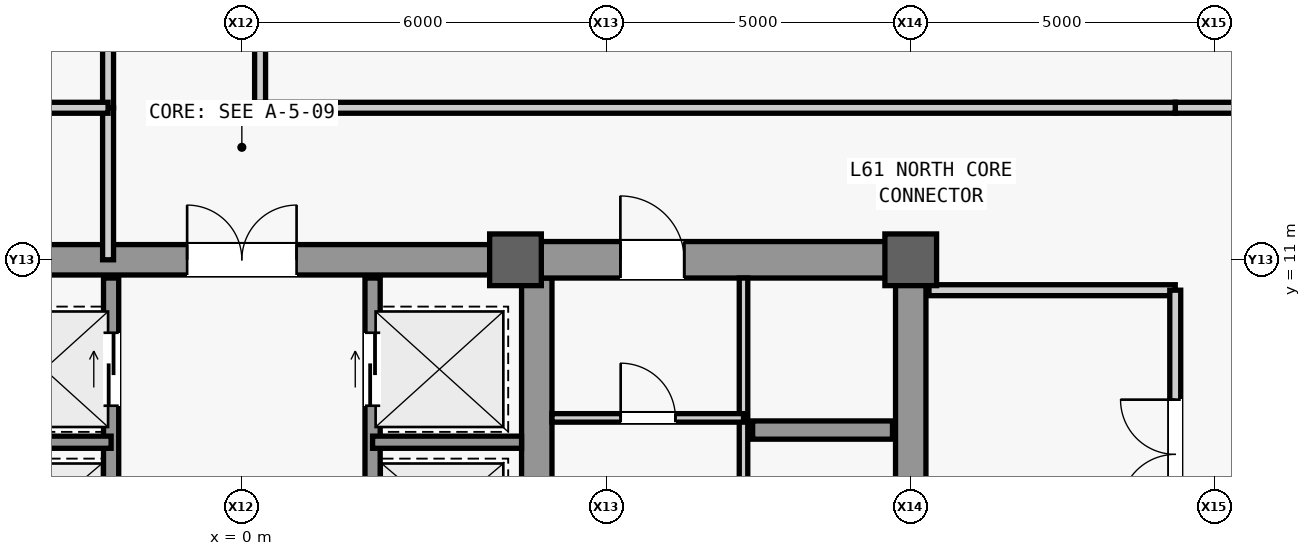
"""IFC4 building model, lengths in metres.
Left out: names, types, materials, properties, quantities, classifications, styles, units other than length and angle.
Written with IfcOpenShell. Run it as: python <this file> out.ifc"""

import sys

from ifc_helpers import new_model, si_unit, direction, frame, frame_2d, origin, origin_2d, place, context, subcontext, project, spatial, rectangle, extrude, source, transform, mapped, element, fill, save


model = new_model("IFC4")
c1 = context("Model", 3, precision=1e-05, world=origin(), true_north=direction((0.0, 1.0)))
c2 = subcontext(c1, "Body", "Model", "MODEL_VIEW")
j1 = project(units=[si_unit("LENGTHUNIT", "METRE"), si_unit("PLANEANGLEUNIT", "RADIAN")], contexts=[c1])
p1 = place(None, origin())
s1 = spatial("IfcSite", under=j1, at=p1, CompositionType="ELEMENT")
p2 = place(p1, origin())
s2 = spatial("IfcBuilding", under=s1, at=p2, CompositionType="ELEMENT")
p3 = place(p2, frame((0.0, 0.0, 259.1)))
s3 = spatial("IfcBuildingStorey", under=s2, at=p3, CompositionType="ELEMENT", Elevation=259.1)
m1 = source(origin(), c2, "Body", "SweptSolid", [
    extrude(rectangle(XDim=22.0, YDim=0.5, at=frame_2d((11.0, 0.0))), origin(), (0.0, 0.0, 1.0), 3.78),
])
p4 = place(p3, frame((11.0, -11.0, 0.0), z_axis=(0.0, 0.0, 1.0), x_axis=(0.0, 1.0, 0.0)))
e1 = element("IfcWall", 1, at=p4, inside=s3, PredefinedType="SHEAR", context=c2, shape_type="MappedRepresentation", body=[
    mapped(m1, transform((0.0, 0.0, 0.0), scale=1.0)),
])
m2 = source(origin(), c2, "Body", "SweptSolid", [
    extrude(rectangle(XDim=1.1, YDim=2.2, at=frame_2d((0.55, 1.1))), frame((0.0, 0.26, 0.0), z_axis=(0.0, -1.0, 0.0), x_axis=(1.0, 0.0, 0.0)), (0.0, 0.0, 1.0), 0.52),
])
p5 = place(p4, frame((0.8, 0.0, 0.0)))
e2 = element("IfcOpeningElement", 2, at=p5, cuts=e1, PredefinedType="OPENING", context=c2, shape_type="MappedRepresentation", body=[
    mapped(m2, transform((0.0, 0.0, 0.0), scale=1.0)),
])
m3 = source(origin(), c2, "Body", "SweptSolid", [
    extrude(rectangle(XDim=0.9, YDim=2.15, at=frame_2d((0.45, 1.075))), frame((0.0, 0.26, 0.0), z_axis=(0.0, -1.0, 0.0), x_axis=(1.0, 0.0, 0.0)), (0.0, 0.0, 1.0), 0.52),
])
p6 = place(p4, frame((6.2, 0.0, 0.0)))
e3 = element("IfcOpeningElement", 3, at=p6, cuts=e1, PredefinedType="OPENING", context=c2, shape_type="MappedRepresentation", body=[
    mapped(m3, transform((0.0, 0.0, 0.0), scale=1.0)),
])
p7 = place(p4, frame((8.05, 0.0, 0.0)))
e4 = element("IfcOpeningElement", 4, at=p7, cuts=e1, PredefinedType="OPENING", context=c2, shape_type="MappedRepresentation", body=[
    mapped(m3, transform((0.0, 0.0, 0.0), scale=1.0)),
])
m4 = source(origin(), c2, "Body", "SweptSolid", [
    extrude(rectangle(XDim=1.3, YDim=2.3, at=frame_2d((0.65, 1.15))), frame((0.0, 0.26, 0.0), z_axis=(0.0, -1.0, 0.0), x_axis=(1.0, 0.0, 0.0)), (0.0, 0.0, 1.0), 0.52),
])
p8 = place(p4, frame((2.7, 0.0, 0.0)))
e5 = element("IfcOpeningElement", 5, at=p8, cuts=e1, PredefinedType="OPENING", context=c2, shape_type="MappedRepresentation", body=[
    mapped(m4, transform((0.0, 0.0, 0.0), scale=1.0)),
])
p9 = place(p4, frame((13.35, 0.0, 0.0)))
e6 = element("IfcOpeningElement", 6, at=p9, cuts=e1, PredefinedType="OPENING", context=c2, shape_type="MappedRepresentation", body=[
    mapped(m4, transform((0.0, 0.0, 0.0), scale=1.0)),
])
m5 = source(origin(), c2, "Body", "SweptSolid", [
    extrude(rectangle(XDim=21.4, YDim=0.5, at=frame_2d((10.7, 0.0))), origin(), (0.0, 0.0, 1.0), 3.78),
])
p10 = place(p3, frame((4.85, -10.7, 0.0), z_axis=(0.0, 0.0, 1.0), x_axis=(0.0, 1.0, 0.0)))
e7 = element("IfcWall", 7, at=p10, inside=s3, PredefinedType="SHEAR", context=c2, shape_type="MappedRepresentation", body=[
    mapped(m5, transform((0.0, 0.0, 0.0), scale=1.0)),
])
m6 = source(origin(), c2, "Body", "SweptSolid", [
    extrude(rectangle(XDim=5.9, YDim=0.6, at=frame_2d((2.95, 0.0))), origin(), (0.0, 0.0, 1.0), 3.78),
])
p11 = place(p3, frame((4.85, 11.0, 0.0), z_axis=(0.0, 0.0, 1.0), x_axis=(1.0, 0.0, 0.0)))
e8 = element("IfcWall", 8, at=p11, inside=s3, PredefinedType="SHEAR", context=c2, shape_type="MappedRepresentation", body=[
    mapped(m6, transform((0.0, 0.0, 0.0), scale=1.0)),
])
m7 = source(origin(), c2, "Body", "SweptSolid", [
    extrude(rectangle(XDim=1.05, YDim=2.2, at=frame_2d((0.525, 1.1))), frame((0.0, 0.31, 0.0), z_axis=(0.0, -1.0, 0.0), x_axis=(1.0, 0.0, 0.0)), (0.0, 0.0, 1.0), 0.62),
])
p12 = place(p11, frame((1.375, 0.0, 0.0)))
e9 = element("IfcOpeningElement", 9, at=p12, cuts=e8, PredefinedType="OPENING", context=c2, shape_type="MappedRepresentation", body=[
    mapped(m7, transform((0.0, 0.0, 0.0), scale=1.0)),
])
m8 = source(origin(), c2, "Body", "SweptSolid", [
    extrude(rectangle(XDim=9.2, YDim=0.5, at=frame_2d((4.6, 0.0))), origin(), (0.0, 0.0, 1.0), 3.78),
])
p13 = place(p3, frame((-4.6, 11.0, 0.0), z_axis=(0.0, 0.0, 1.0), x_axis=(1.0, 0.0, 0.0)))
e10 = element("IfcWall", 10, at=p13, inside=s3, PredefinedType="SHEAR", context=c2, shape_type="MappedRepresentation", body=[
    mapped(m8, transform((0.0, 0.0, 0.0), scale=1.0)),
])
m9 = source(origin(), c2, "Body", "SweptSolid", [
    extrude(rectangle(XDim=1.8, YDim=2.25, at=frame_2d((0.9, 1.125))), frame((0.0, 0.26, 0.0), z_axis=(0.0, -1.0, 0.0), x_axis=(1.0, 0.0, 0.0)), (0.0, 0.0, 1.0), 0.52),
])
p14 = place(p13, frame((3.7, 0.0, 0.0)))
e11 = element("IfcOpeningElement", 11, at=p14, cuts=e10, PredefinedType="OPENING", context=c2, shape_type="MappedRepresentation", body=[
    mapped(m9, transform((0.0, 0.0, 0.0), scale=1.0)),
])
m10 = source(origin(), c2, "Body", "SweptSolid", [
    extrude(rectangle(XDim=0.85, YDim=0.85, at=origin_2d()), origin(), (0.0, 0.0, 1.0), 4.0),
])
for number, where, z_axis, x_axis in (
    (12, (4.5, 11.0, 0.0), (0.0, 0.0, 1.0), (1.0, 0.0, 0.0)),
    (13, (11.0, 11.0, 0.0), (0.0, 0.0, 1.0), (1.0, 0.0, 0.0)),
):
    element("IfcColumn", number, at=place(p3, frame(where, z_axis=z_axis, x_axis=x_axis)), inside=s3, PredefinedType="COLUMN", context=c2, shape_type="MappedRepresentation", body=[
        mapped(m10, transform((0.0, 0.0, 0.0), scale=1.0)),
    ])
m11 = source(origin(), c2, "Body", "SweptSolid", [
    extrude(rectangle(XDim=2.3, YDim=0.3, at=frame_2d((1.15, 0.0))), origin(), (0.0, 0.0, 1.0), 3.78),
])
p15 = place(p3, frame((8.4, 8.2, 0.0), z_axis=(0.0, 0.0, 1.0), x_axis=(1.0, 0.0, 0.0)))
e14 = element("IfcWall", 14, at=p15, inside=s3, PredefinedType="SHEAR", context=c2, shape_type="MappedRepresentation", body=[
    mapped(m11, transform((0.0, 0.0, 0.0), scale=1.0)),
])
m12 = source(origin(), c2, "Body", "SweptSolid", [
    extrude(rectangle(XDim=9.4, YDim=0.14, at=frame_2d((4.7, 0.0))), origin(), (0.0, 0.0, 1.0), 3.78),
])
p16 = place(p3, frame((8.25, 1.3, 0.0), z_axis=(0.0, 0.0, 1.0), x_axis=(0.0, 1.0, 0.0)))
e15 = element("IfcWall", 15, at=p16, inside=s3, PredefinedType="PARTITIONING", context=c2, shape_type="MappedRepresentation", body=[
    mapped(m12, transform((0.0, 0.0, 0.0), scale=1.0)),
])
m13 = source(origin(), c2, "Body", "SweptSolid", [
    extrude(rectangle(XDim=3.15, YDim=0.14, at=frame_2d((1.575, 0.0))), origin(), (0.0, 0.0, 1.0), 3.78),
])
p17 = place(p3, frame((5.1, 8.4, 0.0), z_axis=(0.0, 0.0, 1.0), x_axis=(1.0, 0.0, 0.0)))
e16 = element("IfcWall", 16, at=p17, inside=s3, PredefinedType="PARTITIONING", context=c2, shape_type="MappedRepresentation", body=[
    mapped(m13, transform((0.0, 0.0, 0.0), scale=1.0)),
])
m14 = source(origin(), c2, "Body", "SweptSolid", [
    extrude(rectangle(XDim=0.9, YDim=2.15, at=frame_2d((0.45, 1.075))), frame((0.0, 0.08, 0.0), z_axis=(0.0, -1.0, 0.0), x_axis=(1.0, 0.0, 0.0)), (0.0, 0.0, 1.0), 0.16),
])
p18 = place(p17, frame((1.13, 0.0, 0.0)))
e17 = element("IfcOpeningElement", 17, at=p18, cuts=e16, PredefinedType="OPENING", context=c2, shape_type="MappedRepresentation", body=[
    mapped(m14, transform((0.0, 0.0, 0.0), scale=1.0)),
])
m15 = source(origin(), c2, "Body", "SweptSolid", [
    extrude(rectangle(XDim=4.05, YDim=0.18, at=frame_2d((2.025, 0.0))), origin(), (0.0, 0.0, 1.0), 3.78),
])
p19 = place(p3, frame((11.3, 10.5, 0.0), z_axis=(0.0, 0.0, 1.0), x_axis=(1.0, 0.0, 0.0)))
e18 = element("IfcWall", 18, at=p19, inside=s3, PredefinedType="PARTITIONING", context=c2, shape_type="MappedRepresentation", body=[
    mapped(m15, transform((0.0, 0.0, 0.0), scale=1.0)),
])
m16 = source(origin(), c2, "Body", "SweptSolid", [
    extrude(rectangle(XDim=16.6, YDim=0.18, at=frame_2d((8.3, 0.0))), origin(), (0.0, 0.0, 1.0), 3.78),
])
p20 = place(p3, frame((15.35, -6.1, 0.0), z_axis=(0.0, 0.0, 1.0), x_axis=(0.0, 1.0, 0.0)))
e19 = element("IfcWall", 19, at=p20, inside=s3, PredefinedType="PARTITIONING", context=c2, shape_type="MappedRepresentation", body=[
    mapped(m16, transform((0.0, 0.0, 0.0), scale=1.0)),
])
m17 = source(origin(), c2, "Body", "SweptSolid", [
    extrude(rectangle(XDim=1.8, YDim=2.25, at=frame_2d((0.9, 1.125))), frame((0.0, 0.1, 0.0), z_axis=(0.0, -1.0, 0.0), x_axis=(1.0, 0.0, 0.0)), (0.0, 0.0, 1.0), 0.2),
])
p21 = place(p20, frame((2.7, 0.0, 0.0)))
e20 = element("IfcOpeningElement", 20, at=p21, cuts=e19, PredefinedType="OPENING", context=c2, shape_type="MappedRepresentation", body=[
    mapped(m17, transform((0.0, 0.0, 0.0), scale=1.0)),
])
p22 = place(p20, frame((13.0, 0.0, 0.0)))
e21 = element("IfcOpeningElement", 21, at=p22, cuts=e19, PredefinedType="OPENING", context=c2, shape_type="MappedRepresentation", body=[
    mapped(m17, transform((0.0, 0.0, 0.0), scale=1.0)),
])
m18 = source(origin(), c2, "Body", "SweptSolid", [
    extrude(rectangle(XDim=5.4, YDim=0.25, at=frame_2d((2.7, 0.0))), origin(), (0.0, 0.0, 1.0), 3.78),
])
p23 = place(p3, frame((-2.15, 5.3, 0.0), z_axis=(0.0, 0.0, 1.0), x_axis=(0.0, 1.0, 0.0)))
e22 = element("IfcWall", 22, at=p23, inside=s3, PredefinedType="SHEAR", context=c2, shape_type="MappedRepresentation", body=[
    mapped(m18, transform((0.0, 0.0, 0.0), scale=1.0)),
])
m19 = source(origin(), c2, "Body", "SweptSolid", [
    extrude(rectangle(XDim=1.2, YDim=2.3, at=frame_2d((0.6, 1.15))), frame((0.0, 0.135, 0.0), z_axis=(0.0, -1.0, 0.0), x_axis=(1.0, 0.0, 0.0)), (0.0, 0.0, 1.0), 0.27),
])
p24 = place(p23, frame((3.3, 0.0, 0.0)))
e23 = element("IfcOpeningElement", 23, at=p24, cuts=e22, PredefinedType="OPENING", context=c2, shape_type="MappedRepresentation", body=[
    mapped(m19, transform((0.0, 0.0, 0.0), scale=1.0)),
])
p25 = place(p23, frame((0.9, 0.0, 0.0)))
e24 = element("IfcOpeningElement", 24, at=p25, cuts=e22, PredefinedType="OPENING", context=c2, shape_type="MappedRepresentation", body=[
    mapped(m19, transform((0.0, 0.0, 0.0), scale=1.0)),
])
p26 = place(p3, frame((2.15, 5.3, 0.0), z_axis=(0.0, 0.0, 1.0), x_axis=(0.0, 1.0, 0.0)))
e25 = element("IfcWall", 25, at=p26, inside=s3, PredefinedType="SHEAR", context=c2, shape_type="MappedRepresentation", body=[
    mapped(m18, transform((0.0, 0.0, 0.0), scale=1.0)),
])
p27 = place(p26, frame((3.3, 0.0, 0.0)))
e26 = element("IfcOpeningElement", 26, at=p27, cuts=e25, PredefinedType="OPENING", context=c2, shape_type="MappedRepresentation", body=[
    mapped(m19, transform((0.0, 0.0, 0.0), scale=1.0)),
])
p28 = place(p26, frame((0.9, 0.0, 0.0)))
e27 = element("IfcOpeningElement", 27, at=p28, cuts=e25, PredefinedType="OPENING", context=c2, shape_type="MappedRepresentation", body=[
    mapped(m19, transform((0.0, 0.0, 0.0), scale=1.0)),
])
m20 = source(origin(), c2, "Body", "SweptSolid", [
    extrude(rectangle(XDim=2.45, YDim=0.2, at=frame_2d((1.225, 0.0))), origin(), (0.0, 0.0, 1.0), 3.78),
])
for number, where, z_axis, x_axis in (
    (28, (-4.6, 8.0, 0.0), (0.0, 0.0, 1.0), (1.0, 0.0, 0.0)),
    (29, (2.15, 8.0, 0.0), (0.0, 0.0, 1.0), (1.0, 0.0, 0.0)),
):
    element("IfcWall", number, at=place(p3, frame(where, z_axis=z_axis, x_axis=x_axis)), inside=s3, PredefinedType="SHEAR", context=c2, shape_type="MappedRepresentation", body=[
        mapped(m20, transform((0.0, 0.0, 0.0), scale=1.0)),
    ])
m21 = source(origin(), c2, "Body", "SweptSolid", [
    extrude(rectangle(XDim=2.45, YDim=0.18, at=frame_2d((1.225, 0.0))), origin(), (0.0, 0.0, 1.0), 3.78),
])
p29 = place(p3, frame((15.35, 13.5, 0.0), z_axis=(0.0, 0.0, 1.0), x_axis=(1.0, 0.0, 0.0)))
e30 = element("IfcWall", 30, at=p29, inside=s3, PredefinedType="PARTITIONING", context=c2, shape_type="MappedRepresentation", body=[
    mapped(m21, transform((0.0, 0.0, 0.0), scale=1.0)),
])
m22 = source(origin(), c2, "Body", "SweptSolid", [
    extrude(rectangle(XDim=2.5, YDim=0.18, at=frame_2d((1.25, 0.0))), origin(), (0.0, 0.0, 1.0), 3.78),
])
p30 = place(p3, frame((-2.2, 11.0, 0.0), z_axis=(0.0, 0.0, 1.0), x_axis=(0.0, 1.0, 0.0)))
e31 = element("IfcWall", 31, at=p30, inside=s3, PredefinedType="PARTITIONING", context=c2, shape_type="MappedRepresentation", body=[
    mapped(m22, transform((0.0, 0.0, 0.0), scale=1.0)),
])
m23 = source(origin(), c2, "Body", "SweptSolid", [
    extrude(rectangle(XDim=16.5, YDim=0.18, at=frame_2d((8.25, 0.0))), origin(), (0.0, 0.0, 1.0), 3.78),
])
p31 = place(p3, frame((-2.2, 13.5, 0.0), z_axis=(0.0, 0.0, 1.0), x_axis=(0.0, 1.0, 0.0)))
e32 = element("IfcWall", 32, at=p31, inside=s3, PredefinedType="PARTITIONING", context=c2, shape_type="MappedRepresentation", body=[
    mapped(m23, transform((0.0, 0.0, 0.0), scale=1.0)),
])
m24 = source(origin(), c2, "Body", "SweptSolid", [
    extrude(rectangle(XDim=1.05, YDim=2.2, at=frame_2d((0.525, 1.1))), frame((0.0, 0.1, 0.0), z_axis=(0.0, -1.0, 0.0), x_axis=(1.0, 0.0, 0.0)), (0.0, 0.0, 1.0), 0.2),
])
p32 = place(p31, frame((11.85, 0.0, 0.0)))
e33 = element("IfcOpeningElement", 33, at=p32, cuts=e32, PredefinedType="OPENING", context=c2, shape_type="MappedRepresentation", body=[
    mapped(m24, transform((0.0, 0.0, 0.0), scale=1.0)),
])
m25 = source(origin(), c2, "Body", "SweptSolid", [
    extrude(rectangle(XDim=13.15, YDim=0.18, at=frame_2d((6.575, 0.0))), origin(), (0.0, 0.0, 1.0), 3.78),
])
p33 = place(p3, frame((-15.35, 13.5, 0.0), z_axis=(0.0, 0.0, 1.0), x_axis=(1.0, 0.0, 0.0)))
e34 = element("IfcWall", 34, at=p33, inside=s3, PredefinedType="PARTITIONING", context=c2, shape_type="MappedRepresentation", body=[
    mapped(m25, transform((0.0, 0.0, 0.0), scale=1.0)),
])
m26 = source(origin(), c2, "Body", "SweptSolid", [
    extrude(rectangle(XDim=16.5, YDim=0.18, at=frame_2d((8.25, 0.0))), origin(), (0.0, 0.0, 1.0), 2.965),
])
p34 = place(p3, frame((0.3, 13.5, 0.0), z_axis=(0.0, 0.0, 1.0), x_axis=(0.0, 1.0, 0.0)))
e35 = element("IfcWall", 35, at=p34, inside=s3, PredefinedType="PARTITIONING", context=c2, shape_type="MappedRepresentation", body=[
    mapped(m26, transform((0.0, 0.0, 0.0), scale=1.0)),
])
p35 = place(p34, frame((11.85, 0.0, 0.0)))
e36 = element("IfcOpeningElement", 36, at=p35, cuts=e35, PredefinedType="OPENING", context=c2, shape_type="MappedRepresentation", body=[
    mapped(m24, transform((0.0, 0.0, 0.0), scale=1.0)),
])
m27 = source(origin(), c2, "Body", "SweptSolid", [
    extrude(rectangle(XDim=15.05, YDim=0.18, at=frame_2d((7.525, 0.0))), origin(), (0.0, 0.0, 1.0), 3.78),
])
p36 = place(p3, frame((0.3, 13.5, 0.0), z_axis=(0.0, 0.0, 1.0), x_axis=(1.0, 0.0, 0.0)))
e37 = element("IfcWall", 37, at=p36, inside=s3, PredefinedType="PARTITIONING", context=c2, shape_type="MappedRepresentation", body=[
    mapped(m27, transform((0.0, 0.0, 0.0), scale=1.0)),
])
m28 = source(origin(), c2, "Body", "SweptSolid", [
    extrude(rectangle(XDim=1.05, YDim=2.2, at=frame_2d((0.525, 1.1))), frame((0.0, 0.025, 0.0), z_axis=(0.0, -1.0, 0.0), x_axis=(1.0, 0.0, 0.0)), (0.0, 0.0, 1.0), 0.05),
])
p37 = place(p12, origin())
e38 = element("IfcDoor", 38, at=p37, inside=s3, OperationType="SINGLE_SWING_LEFT", PredefinedType="DOOR", context=c2, shape_type="MappedRepresentation", body=[
    mapped(m28, transform((0.0, 0.0, 0.0), scale=1.0)),
])
fill(e9, e38)
m29 = source(origin(), c2, "Body", "SweptSolid", [
    extrude(rectangle(XDim=0.9, YDim=2.15, at=frame_2d((0.45, 1.075))), frame((0.0, 0.025, 0.0), z_axis=(0.0, -1.0, 0.0), x_axis=(1.0, 0.0, 0.0)), (0.0, 0.0, 1.0), 0.05),
])
p38 = place(p18, origin())
e39 = element("IfcDoor", 39, at=p38, inside=s3, OperationType="SINGLE_SWING_LEFT", PredefinedType="DOOR", context=c2, shape_type="MappedRepresentation", body=[
    mapped(m29, transform((0.0, 0.0, 0.0), scale=1.0)),
])
fill(e17, e39)
m30 = source(origin(), c2, "Body", "SweptSolid", [
    extrude(rectangle(XDim=1.8, YDim=2.25, at=frame_2d((0.9, 1.125))), frame((0.0, 0.025, 0.0), z_axis=(0.0, -1.0, 0.0), x_axis=(1.0, 0.0, 0.0)), (0.0, 0.0, 1.0), 0.05),
])
p39 = place(p22, origin())
e40 = element("IfcDoor", 40, at=p39, inside=s3, OperationType="SINGLE_SWING_LEFT", PredefinedType="DOOR", context=c2, shape_type="MappedRepresentation", body=[
    mapped(m30, transform((0.0, 0.0, 0.0), scale=1.0)),
])
fill(e21, e40)
p40 = place(p14, origin())
e41 = element("IfcDoor", 41, at=p40, inside=s3, OperationType="SINGLE_SWING_RIGHT", PredefinedType="DOOR", context=c2, shape_type="MappedRepresentation", body=[
    mapped(m30, transform((0.0, 0.0, 0.0), scale=1.0)),
])
fill(e11, e41)
m31 = source(origin(), c2, "Body", "SweptSolid", [
    extrude(rectangle(XDim=1.2, YDim=2.3, at=frame_2d((0.6, 1.15))), frame((0.0, 0.025, 0.0), z_axis=(0.0, -1.0, 0.0), x_axis=(1.0, 0.0, 0.0)), (0.0, 0.0, 1.0), 0.05),
])
p41 = place(p24, origin())
e42 = element("IfcDoor", 42, at=p41, inside=s3, OperationType="SLIDING_TO_LEFT", PredefinedType="DOOR", context=c2, shape_type="MappedRepresentation", body=[
    mapped(m31, transform((0.0, 0.0, 0.0), scale=1.0)),
])
fill(e23, e42)
p42 = place(p27, origin())
e43 = element("IfcDoor", 43, at=p42, inside=s3, OperationType="SLIDING_TO_LEFT", PredefinedType="DOOR", context=c2, shape_type="MappedRepresentation", body=[
    mapped(m31, transform((0.0, 0.0, 0.0), scale=1.0)),
])
fill(e26, e43)
save(model, sys.argv[1])
